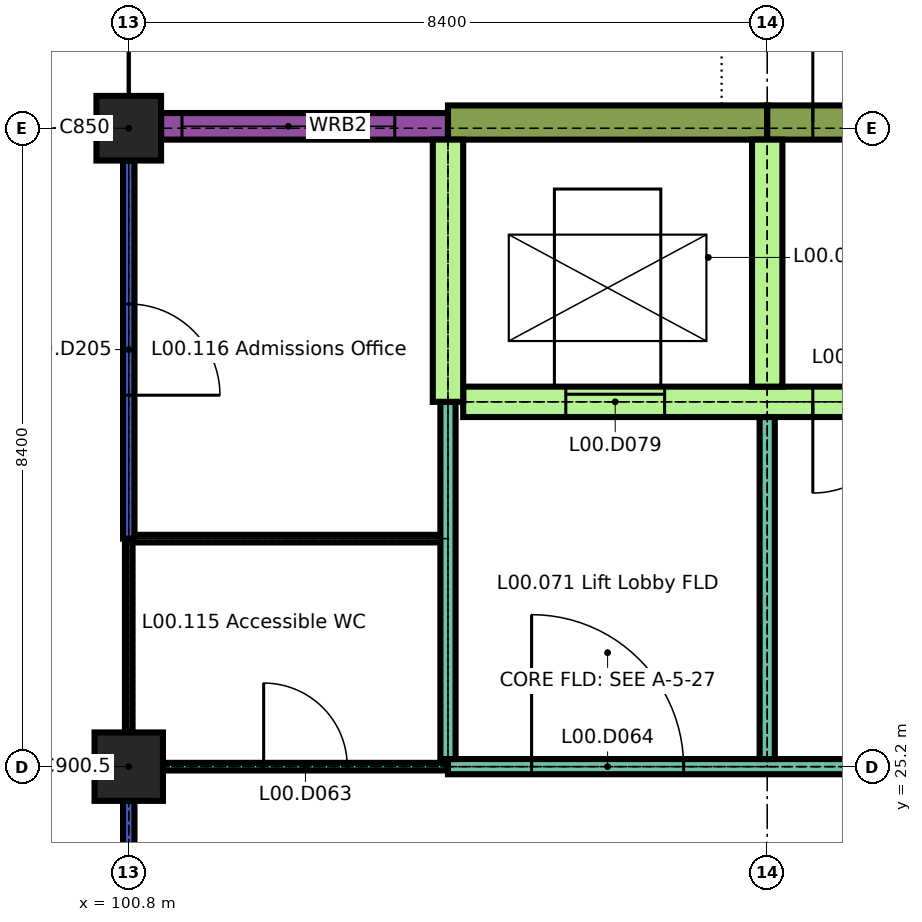
"""IFC4 building model, lengths in metres.
Left out: names, types, materials, properties, quantities, classifications, styles, units other than length and angle.
Written with IfcOpenShell. Run it as: python <this file> out.ifc"""

import sys

from ifc_helpers import new_model, si_unit, direction, frame, frame_2d, origin, origin_2d, place, context, subcontext, project, spatial, rectangle, extrude, element, fill, save


model = new_model("IFC4")
c1 = context("Model", 3, precision=1e-05, world=origin(), true_north=direction((0.0, 1.0)))
c2 = subcontext(c1, "Body", "Model", "MODEL_VIEW")
j1 = project(units=[si_unit("LENGTHUNIT", "METRE"), si_unit("PLANEANGLEUNIT", "RADIAN")], contexts=[c1])
p1 = place(None, origin())
s1 = spatial("IfcSite", under=j1, at=p1, CompositionType="ELEMENT")
p2 = place(p1, origin())
s2 = spatial("IfcBuilding", under=s1, at=p2, CompositionType="ELEMENT")
p3 = place(p2, origin())
s3 = spatial("IfcBuildingStorey", under=s2, at=p3, CompositionType="ELEMENT", Elevation=0.0)
p4 = place(p3, frame((100.8, 25.2, 0.0), z_axis=(0.0, 0.0, 1.0), x_axis=(1.0, 0.0, 0.0)))
e1 = element("IfcColumn", 1, at=p4, inside=s3, PredefinedType="COLUMN", context=c2, shape_type="SweptSolid", body=[
    extrude(rectangle(XDim=0.9, YDim=0.9, at=origin_2d()), origin(), (0.0, 0.0, 1.0), 4.14),
])
p5 = place(p3, frame((100.8, 33.6, 0.0), z_axis=(0.0, 0.0, 1.0), x_axis=(1.0, 0.0, 0.0)))
e2 = element("IfcColumn", 2, at=p5, inside=s3, PredefinedType="COLUMN", context=c2, shape_type="SweptSolid", body=[
    extrude(rectangle(XDim=0.85, YDim=0.85, at=origin_2d()), origin(), (0.0, 0.0, 1.0), 4.14),
])
p6 = place(p3, frame((101.225, 33.625, 0.0), z_axis=(0.0, 0.0, 1.0), x_axis=(1.0, 0.0, 0.0)))
e3 = element("IfcWall", 3, at=p6, inside=s3, PredefinedType="SOLIDWALL", context=c2, shape_type="SweptSolid", body=[
    extrude(rectangle(XDim=3.775, YDim=0.35, at=frame_2d((1.887, 0.0))), origin(), (0.0, 0.0, 1.0), 3.84),
])
p7 = place(p6, frame((0.275, 0.0, 1.0)))
e4 = element("IfcOpeningElement", 4, at=p7, cuts=e3, PredefinedType="OPENING", context=c2, shape_type="SweptSolid", body=[
    extrude(rectangle(XDim=2.8, YDim=1.5, at=frame_2d((1.4, 0.75))), frame((0.0, 0.185, 0.0), z_axis=(0.0, -1.0, 0.0), x_axis=(1.0, 0.0, 0.0)), (0.0, 0.0, 1.0), 0.37),
])
p8 = place(p3, frame((105.0, 33.675, 0.0), z_axis=(0.0, 0.0, 1.0), x_axis=(1.0, 0.0, 0.0)))
e5 = element("IfcWall", 5, at=p8, inside=s3, PredefinedType="SOLIDWALL", context=c2, shape_type="SweptSolid", body=[
    extrude(rectangle(XDim=4.2, YDim=0.45, at=frame_2d((2.1, 0.0))), origin(), (0.0, 0.0, 1.0), 4.14),
])
p9 = place(p3, frame((109.2, 33.675, 0.0), z_axis=(0.0, 0.0, 1.0), x_axis=(1.0, 0.0, 0.0)))
e6 = element("IfcWall", 6, at=p9, inside=s3, PredefinedType="SOLIDWALL", context=c2, shape_type="SweptSolid", body=[
    extrude(rectangle(XDim=3.7, YDim=0.45, at=frame_2d((1.85, 0.0))), origin(), (0.0, 0.0, 1.0), 4.14),
])
p10 = place(p9, frame((0.6, 0.0, 0.0)))
e7 = element("IfcOpeningElement", 7, at=p10, cuts=e6, PredefinedType="OPENING", context=c2, shape_type="SweptSolid", body=[
    extrude(rectangle(XDim=1.2, YDim=2.1, at=frame_2d((0.6, 1.05))), frame((0.0, 0.235, 0.0), z_axis=(0.0, -1.0, 0.0), x_axis=(1.0, 0.0, 0.0)), (0.0, 0.0, 1.0), 0.47),
])
p11 = place(p3, frame((101.25, 25.2, 0.0), z_axis=(0.0, 0.0, 1.0), x_axis=(1.0, 0.0, 0.0)))
e8 = element("IfcWall", 8, at=p11, inside=s3, PredefinedType="PARTITIONING", context=c2, shape_type="SweptSolid", body=[
    extrude(rectangle(XDim=3.75, YDim=0.1, at=frame_2d((1.875, 0.0))), origin(), (0.0, 0.0, 1.0), 4.14),
])
p12 = place(p11, frame((1.325, 0.0, 0.0)))
e9 = element("IfcOpeningElement", 9, at=p12, cuts=e8, PredefinedType="OPENING", context=c2, shape_type="SweptSolid", body=[
    extrude(rectangle(XDim=1.1, YDim=2.1, at=frame_2d((0.55, 1.05))), frame((0.0, 0.06, 0.0), z_axis=(0.0, -1.0, 0.0), x_axis=(1.0, 0.0, 0.0)), (0.0, 0.0, 1.0), 0.12),
])
p13 = place(p3, frame((105.0, 25.2, 0.0), z_axis=(0.0, 0.0, 1.0), x_axis=(1.0, 0.0, 0.0)))
e10 = element("IfcWall", 10, at=p13, inside=s3, PredefinedType="PARTITIONING", context=c2, shape_type="SweptSolid", body=[
    extrude(rectangle(XDim=12.6, YDim=0.2, at=frame_2d((6.3, 0.0))), origin(), (0.0, 0.0, 1.0), 4.14),
])
p14 = place(p13, frame((1.1, 0.0, 0.0)))
e11 = element("IfcOpeningElement", 11, at=p14, cuts=e10, PredefinedType="OPENING", context=c2, shape_type="SweptSolid", body=[
    extrude(rectangle(XDim=2.0, YDim=2.4, at=frame_2d((1.0, 1.2))), frame((0.0, 0.11, 0.0), z_axis=(0.0, -1.0, 0.0), x_axis=(1.0, 0.0, 0.0)), (0.0, 0.0, 1.0), 0.22),
])
p15 = place(p13, frame((7.7, 0.0, 0.0)))
e12 = element("IfcOpeningElement", 12, at=p15, cuts=e10, PredefinedType="OPENING", context=c2, shape_type="SweptSolid", body=[
    extrude(rectangle(XDim=1.4, YDim=2.1, at=frame_2d((0.7, 1.05))), frame((0.0, 0.11, 0.0), z_axis=(0.0, -1.0, 0.0), x_axis=(1.0, 0.0, 0.0)), (0.0, 0.0, 1.0), 0.22),
])
p16 = place(p3, frame((100.875, 28.2, 0.0), z_axis=(0.0, 0.0, 1.0), x_axis=(1.0, 0.0, 0.0)))
e13 = element("IfcWall", 13, at=p16, inside=s3, PredefinedType="PARTITIONING", context=c2, shape_type="SweptSolid", body=[
    extrude(rectangle(XDim=4.025, YDim=0.1, at=frame_2d((2.012, 0.0))), origin(), (0.0, 0.0, 1.0), 4.14),
])
p17 = place(p3, frame((105.2, 30.0, 0.0), z_axis=(0.0, 0.0, 1.0), x_axis=(1.0, 0.0, 0.0)))
e14 = element("IfcWall", 14, at=p17, inside=s3, PredefinedType="SHEAR", context=c2, shape_type="SweptSolid", body=[
    extrude(rectangle(XDim=20.6, YDim=0.4, at=frame_2d((10.3, 0.0))), origin(), (0.0, 0.0, 1.0), 4.14),
])
p18 = place(p17, frame((1.35, 0.0, 0.0)))
e15 = element("IfcOpeningElement", 15, at=p18, cuts=e14, PredefinedType="OPENING", context=c2, shape_type="SweptSolid", body=[
    extrude(rectangle(XDim=1.3, YDim=2.1, at=frame_2d((0.65, 1.05))), frame((0.0, 0.21, 0.0), z_axis=(0.0, -1.0, 0.0), x_axis=(1.0, 0.0, 0.0)), (0.0, 0.0, 1.0), 0.42),
])
p19 = place(p17, frame((4.6, 0.0, 0.0)))
e16 = element("IfcOpeningElement", 16, at=p19, cuts=e14, PredefinedType="OPENING", context=c2, shape_type="SweptSolid", body=[
    extrude(rectangle(XDim=1.2, YDim=2.1, at=frame_2d((0.6, 1.05))), frame((0.0, 0.21, 0.0), z_axis=(0.0, -1.0, 0.0), x_axis=(1.0, 0.0, 0.0)), (0.0, 0.0, 1.0), 0.42),
])
p20 = place(p17, frame((13.0, 0.0, 0.0)))
e17 = element("IfcOpeningElement", 17, at=p20, cuts=e14, PredefinedType="OPENING", context=c2, shape_type="SweptSolid", body=[
    extrude(rectangle(XDim=1.2, YDim=2.1, at=frame_2d((0.6, 1.05))), frame((0.0, 0.21, 0.0), z_axis=(0.0, -1.0, 0.0), x_axis=(1.0, 0.0, 0.0)), (0.0, 0.0, 1.0), 0.42),
])
p21 = place(p3, frame((100.8, 22.2, 0.0), z_axis=(0.0, 0.0, 1.0), x_axis=(0.0, 1.0, 0.0)))
e18 = element("IfcWall", 18, at=p21, inside=s3, PredefinedType="PARTITIONING", context=c2, shape_type="SweptSolid", body=[
    extrude(rectangle(XDim=2.55, YDim=0.15, at=frame_2d((1.275, 0.0))), origin(), (0.0, 0.0, 1.0), 4.14),
])
p22 = place(p21, frame((0.575, 0.0, 0.0)))
e19 = element("IfcOpeningElement", 19, at=p22, cuts=e18, PredefinedType="OPENING", context=c2, shape_type="SweptSolid", body=[
    extrude(rectangle(XDim=1.4, YDim=2.1, at=frame_2d((0.7, 1.05))), frame((0.0, 0.085, 0.0), z_axis=(0.0, -1.0, 0.0), x_axis=(1.0, 0.0, 0.0)), (0.0, 0.0, 1.0), 0.17),
])
p23 = place(p3, frame((100.8, 25.65, 0.0), z_axis=(0.0, 0.0, 1.0), x_axis=(0.0, 1.0, 0.0)))
e20 = element("IfcWall", 20, at=p23, inside=s3, PredefinedType="PARTITIONING", context=c2, shape_type="SweptSolid", body=[
    extrude(rectangle(XDim=2.55, YDim=0.1, at=frame_2d((1.275, 0.0))), origin(), (0.0, 0.0, 1.0), 4.14),
])
p24 = place(p3, frame((100.8, 28.2, 0.0), z_axis=(0.0, 0.0, 1.0), x_axis=(0.0, 1.0, 0.0)))
e21 = element("IfcWall", 21, at=p24, inside=s3, PredefinedType="PARTITIONING", context=c2, shape_type="SweptSolid", body=[
    extrude(rectangle(XDim=4.975, YDim=0.15, at=frame_2d((2.488, 0.0))), origin(), (0.0, 0.0, 1.0), 4.14),
])
p25 = place(p24, frame((1.887, 0.0, 0.0)))
e22 = element("IfcOpeningElement", 22, at=p25, cuts=e21, PredefinedType="OPENING", context=c2, shape_type="SweptSolid", body=[
    extrude(rectangle(XDim=1.2, YDim=2.1, at=frame_2d((0.6, 1.05))), frame((0.0, 0.085, 0.0), z_axis=(0.0, -1.0, 0.0), x_axis=(1.0, 0.0, 0.0)), (0.0, 0.0, 1.0), 0.17),
])
p26 = place(p3, frame((105.0, 25.3, 0.0), z_axis=(0.0, 0.0, 1.0), x_axis=(0.0, 1.0, 0.0)))
e23 = element("IfcWall", 23, at=p26, inside=s3, PredefinedType="PARTITIONING", context=c2, shape_type="SweptSolid", body=[
    extrude(rectangle(XDim=4.7, YDim=0.2, at=frame_2d((2.35, 0.0))), origin(), (0.0, 0.0, 1.0), 4.14),
])
p27 = place(p3, frame((105.0, 30.0, 0.0), z_axis=(0.0, 0.0, 1.0), x_axis=(0.0, 1.0, 0.0)))
e24 = element("IfcWall", 24, at=p27, inside=s3, PredefinedType="SHEAR", context=c2, shape_type="SweptSolid", body=[
    extrude(rectangle(XDim=3.45, YDim=0.4, at=frame_2d((1.725, 0.0))), origin(), (0.0, 0.0, 1.0), 4.14),
])
p28 = place(p3, frame((109.2, 25.3, 0.0), z_axis=(0.0, 0.0, 1.0), x_axis=(0.0, 1.0, 0.0)))
e25 = element("IfcWall", 25, at=p28, inside=s3, PredefinedType="PARTITIONING", context=c2, shape_type="SweptSolid", body=[
    extrude(rectangle(XDim=4.5, YDim=0.2, at=frame_2d((2.25, 0.0))), origin(), (0.0, 0.0, 1.0), 4.14),
])
p29 = place(p3, frame((109.2, 30.2, 0.0), z_axis=(0.0, 0.0, 1.0), x_axis=(0.0, 1.0, 0.0)))
e26 = element("IfcWall", 26, at=p29, inside=s3, PredefinedType="SHEAR", context=c2, shape_type="SweptSolid", body=[
    extrude(rectangle(XDim=3.25, YDim=0.4, at=frame_2d((1.625, 0.0))), origin(), (0.0, 0.0, 1.0), 4.14),
])
p30 = place(p7, origin())
e27 = element("IfcWindow", 27, at=p30, inside=s3, PartitioningType="DOUBLE_PANEL_VERTICAL", PredefinedType="WINDOW", context=c2, shape_type="SweptSolid", body=[
    extrude(rectangle(XDim=2.8, YDim=1.5, at=frame_2d((1.4, 0.75))), frame((0.0, 0.03, 0.0), z_axis=(0.0, -1.0, 0.0), x_axis=(1.0, 0.0, 0.0)), (0.0, 0.0, 1.0), 0.06),
])
fill(e4, e27)
p31 = place(p10, origin())
e28 = element("IfcDoor", 28, at=p31, inside=s3, OperationType="SINGLE_SWING_RIGHT", PredefinedType="DOOR", context=c2, shape_type="SweptSolid", body=[
    extrude(rectangle(XDim=1.2, YDim=2.1, at=frame_2d((0.6, 1.05))), frame((0.0, 0.025, 0.0), z_axis=(0.0, -1.0, 0.0), x_axis=(1.0, 0.0, 0.0)), (0.0, 0.0, 1.0), 0.05),
])
fill(e7, e28)
p32 = place(p12, origin())
e29 = element("IfcDoor", 29, at=p32, inside=s3, OperationType="SINGLE_SWING_RIGHT", PredefinedType="DOOR", context=c2, shape_type="SweptSolid", body=[
    extrude(rectangle(XDim=1.1, YDim=2.1, at=frame_2d((0.55, 1.05))), frame((0.0, 0.025, 0.0), z_axis=(0.0, -1.0, 0.0), x_axis=(1.0, 0.0, 0.0)), (0.0, 0.0, 1.0), 0.05),
])
fill(e9, e29)
p33 = place(p14, origin())
e30 = element("IfcDoor", 30, at=p33, inside=s3, OperationType="SINGLE_SWING_RIGHT", PredefinedType="DOOR", context=c2, shape_type="SweptSolid", body=[
    extrude(rectangle(XDim=2.0, YDim=2.4, at=frame_2d((1.0, 1.2))), frame((0.0, 0.03, 0.0), z_axis=(0.0, -1.0, 0.0), x_axis=(1.0, 0.0, 0.0)), (0.0, 0.0, 1.0), 0.06),
])
fill(e11, e30)
p34 = place(p18, origin())
e31 = element("IfcDoor", 31, at=p34, inside=s3, OperationType="SLIDING_TO_LEFT", PredefinedType="DOOR", context=c2, shape_type="SweptSolid", body=[
    extrude(rectangle(XDim=1.3, YDim=2.1, at=frame_2d((0.65, 1.05))), frame((0.0, 0.025, 0.0), z_axis=(0.0, -1.0, 0.0), x_axis=(1.0, 0.0, 0.0)), (0.0, 0.0, 1.0), 0.05),
])
fill(e15, e31)
p35 = place(p19, origin())
e32 = element("IfcDoor", 32, at=p35, inside=s3, OperationType="SINGLE_SWING_LEFT", PredefinedType="DOOR", context=c2, shape_type="SweptSolid", body=[
    extrude(rectangle(XDim=1.2, YDim=2.1, at=frame_2d((0.6, 1.05))), frame((0.0, 0.025, 0.0), z_axis=(0.0, -1.0, 0.0), x_axis=(1.0, 0.0, 0.0)), (0.0, 0.0, 1.0), 0.05),
])
fill(e16, e32)
p36 = place(p25, origin())
e33 = element("IfcDoor", 33, at=p36, inside=s3, OperationType="SINGLE_SWING_LEFT", PredefinedType="DOOR", context=c2, shape_type="SweptSolid", body=[
    extrude(rectangle(XDim=1.2, YDim=2.1, at=frame_2d((0.6, 1.05))), frame((0.0, 0.025, 0.0), z_axis=(0.0, -1.0, 0.0), x_axis=(1.0, 0.0, 0.0)), (0.0, 0.0, 1.0), 0.05),
])
fill(e22, e33)
save(model, sys.argv[1])
